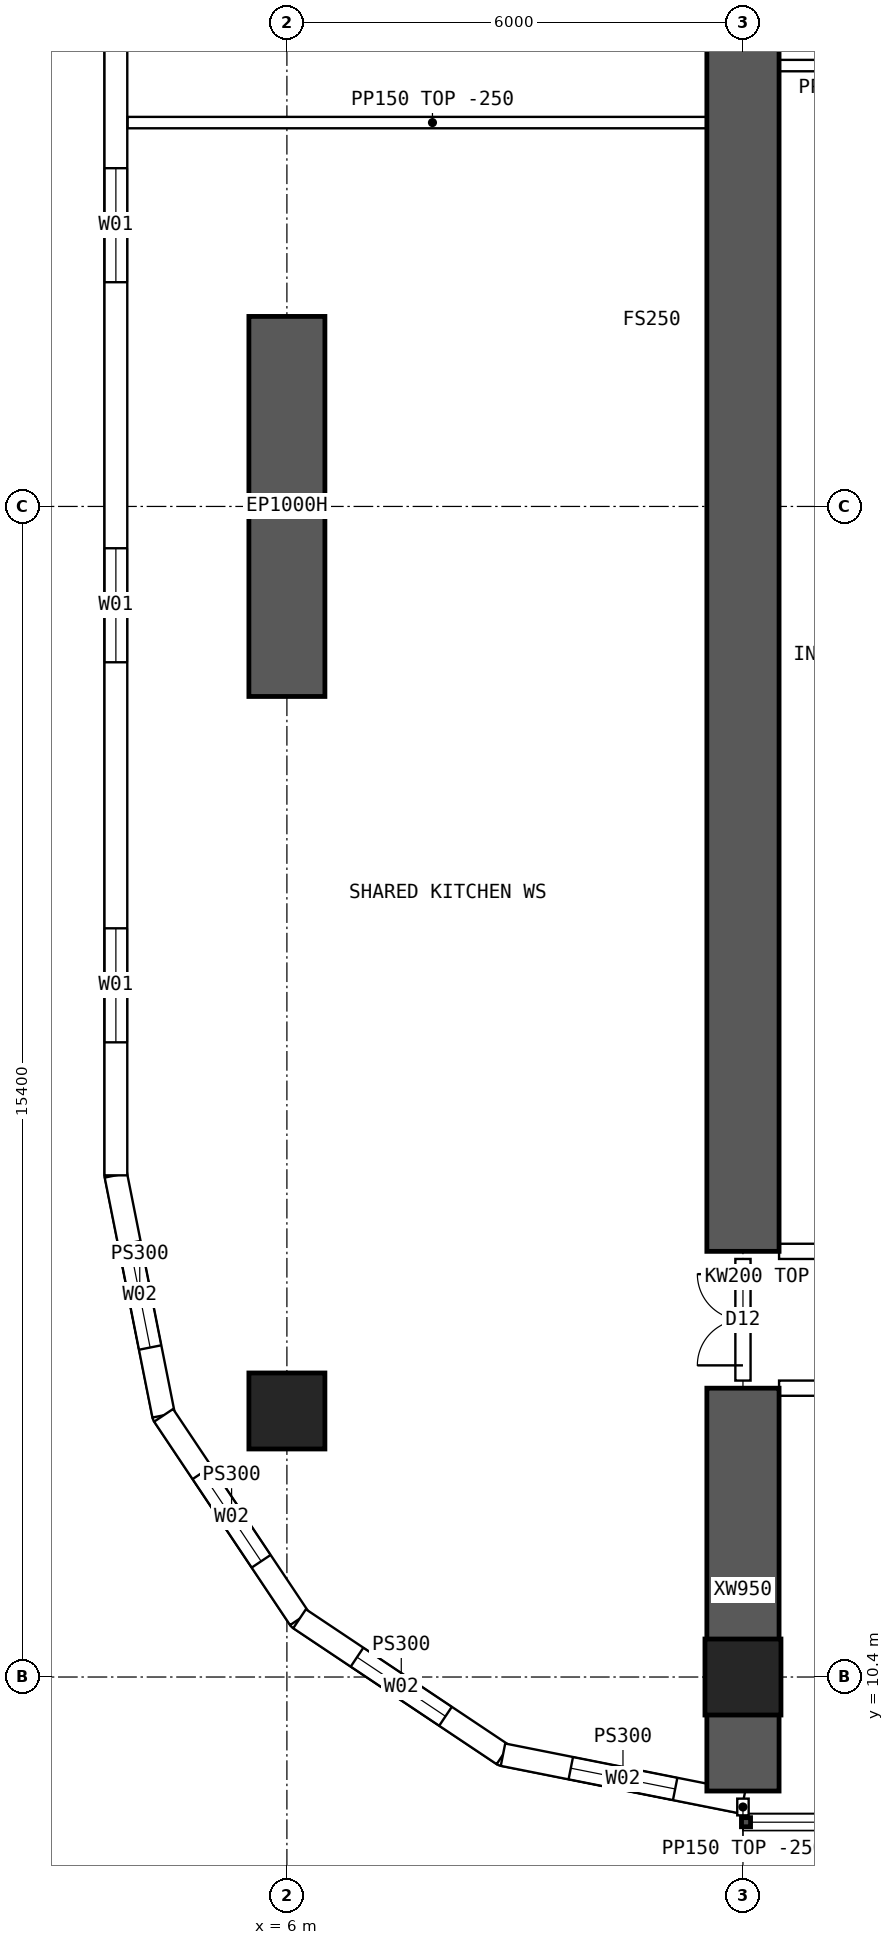
"""IFC4 building model, lengths in metres.
Left out: names, types, materials, properties, quantities, classifications, styles, units other than length and angle.
Written with IfcOpenShell. Run it as: python <this file> out.ifc"""

import sys

from ifc_helpers import new_model, si_unit, direction, frame, frame_2d, origin, origin_2d, place, context, subcontext, project, spatial, polyline, rectangle, hollow_rectangle, outline, extrude, element, fill, save


model = new_model("IFC4")
c1 = context("Model", 3, precision=1e-05, world=origin(), true_north=direction((0.0, 1.0)))
c2 = subcontext(c1, "Body", "Model", "MODEL_VIEW")
j1 = project(units=[si_unit("LENGTHUNIT", "METRE"), si_unit("PLANEANGLEUNIT", "RADIAN")], contexts=[c1])
p1 = place(None, origin())
s1 = spatial("IfcSite", under=j1, at=p1, CompositionType="ELEMENT")
p2 = place(p1, origin())
s2 = spatial("IfcBuilding", under=s1, at=p2, CompositionType="ELEMENT")
p3 = place(p2, frame((0.0, 0.0, 103.15)))
s3 = spatial("IfcBuildingStorey", under=s2, at=p3, CompositionType="ELEMENT", Elevation=103.15)
for number, where, z_axis, x_axis in (
    (1, (12.0, 10.4, 0.0), (0.0, 0.0, 1.0), (1.0, 0.0, 0.0)),
    (2, (6.0, 13.9, 0.0), (0.0, 0.0, 1.0), (1.0, 0.0, 0.0)),
):
    element("IfcColumn", number, at=place(p3, frame(where, z_axis=z_axis, x_axis=x_axis)), inside=s3, PredefinedType="COLUMN", context=c2, shape_type="SweptSolid", body=[
        extrude(hollow_rectangle(XDim=1.0, YDim=1.0, WallThickness=0.1, at=origin_2d()), origin(), (0.0, 0.0, 1.0), 3.75),
    ])
p4 = place(p3, frame((6.0, 23.3, 0.0), z_axis=(0.0, 0.0, 1.0), x_axis=(0.0, 1.0, 0.0)))
e3 = element("IfcWall", 3, at=p4, inside=s3, PredefinedType="SHEAR", context=c2, shape_type="SweptSolid", body=[
    extrude(rectangle(XDim=5.0, YDim=1.0, at=frame_2d((2.5, 0.0))), origin(), (0.0, 0.0, 1.0), 3.75),
])
p5 = place(p3, frame((12.0, 8.9, 0.0), z_axis=(0.0, 0.0, 1.0), x_axis=(0.0, 1.0, 0.0)))
e4 = element("IfcWall", 4, at=p5, inside=s3, PredefinedType="SHEAR", context=c2, shape_type="SweptSolid", body=[
    extrude(rectangle(XDim=5.3, YDim=0.95, at=frame_2d((2.65, 0.0))), origin(), (0.0, 0.0, 1.0), 3.75),
])
p6 = place(p3, frame((12.0, 16.0, 0.0), z_axis=(0.0, 0.0, 1.0), x_axis=(0.0, 1.0, 0.0)))
e5 = element("IfcWall", 5, at=p6, inside=s3, PredefinedType="SHEAR", context=c2, shape_type="SweptSolid", body=[
    extrude(rectangle(XDim=32.0, YDim=0.95, at=frame_2d((16.0, 0.0))), origin(), (0.0, 0.0, 1.0), 3.75),
])
p7 = place(p3, frame((3.75, 47.0, 0.0), z_axis=(0.0, 0.0, 1.0), x_axis=(0.0, -1.0, 0.0)))
e6 = element("IfcWall", 6, at=p7, inside=s3, PredefinedType="SOLIDWALL", context=c2, shape_type="SweptSolid", body=[
    extrude(outline(polyline([(-0.015, -0.15), (30.015, -0.15), (29.985, 0.15), (0.015, 0.15), (-0.015, -0.15)])), origin(), (0.0, 0.0, 1.0), 3.5),
])
p8 = place(p7, frame((1.75, 0.0, 0.9)))
e7 = element("IfcOpeningElement", 7, at=p8, cuts=e6, PredefinedType="OPENING", context=c2, shape_type="SweptSolid", body=[
    extrude(rectangle(XDim=1.5, YDim=2.0, at=frame_2d((0.75, 1.0))), frame((0.0, 0.16, 0.0), z_axis=(0.0, -1.0, 0.0), x_axis=(1.0, 0.0, 0.0)), (0.0, 0.0, 1.0), 0.32),
])
p9 = place(p7, frame((6.75, 0.0, 0.9)))
e8 = element("IfcOpeningElement", 8, at=p9, cuts=e6, PredefinedType="OPENING", context=c2, shape_type="SweptSolid", body=[
    extrude(rectangle(XDim=1.5, YDim=2.0, at=frame_2d((0.75, 1.0))), frame((0.0, 0.16, 0.0), z_axis=(0.0, -1.0, 0.0), x_axis=(1.0, 0.0, 0.0)), (0.0, 0.0, 1.0), 0.32),
])
p10 = place(p7, frame((11.75, 0.0, 0.9)))
e9 = element("IfcOpeningElement", 9, at=p10, cuts=e6, PredefinedType="OPENING", context=c2, shape_type="SweptSolid", body=[
    extrude(rectangle(XDim=1.5, YDim=2.0, at=frame_2d((0.75, 1.0))), frame((0.0, 0.16, 0.0), z_axis=(0.0, -1.0, 0.0), x_axis=(1.0, 0.0, 0.0)), (0.0, 0.0, 1.0), 0.32),
])
p11 = place(p7, frame((16.75, 0.0, 0.9)))
e10 = element("IfcOpeningElement", 10, at=p11, cuts=e6, PredefinedType="OPENING", context=c2, shape_type="SweptSolid", body=[
    extrude(rectangle(XDim=1.5, YDim=2.0, at=frame_2d((0.75, 1.0))), frame((0.0, 0.16, 0.0), z_axis=(0.0, -1.0, 0.0), x_axis=(1.0, 0.0, 0.0)), (0.0, 0.0, 1.0), 0.32),
])
p12 = place(p7, frame((21.75, 0.0, 0.9)))
e11 = element("IfcOpeningElement", 11, at=p12, cuts=e6, PredefinedType="OPENING", context=c2, shape_type="SweptSolid", body=[
    extrude(rectangle(XDim=1.5, YDim=2.0, at=frame_2d((0.75, 1.0))), frame((0.0, 0.16, 0.0), z_axis=(0.0, -1.0, 0.0), x_axis=(1.0, 0.0, 0.0)), (0.0, 0.0, 1.0), 0.32),
])
p13 = place(p7, frame((26.75, 0.0, 0.9)))
e12 = element("IfcOpeningElement", 12, at=p13, cuts=e6, PredefinedType="OPENING", context=c2, shape_type="SweptSolid", body=[
    extrude(rectangle(XDim=1.5, YDim=2.0, at=frame_2d((0.75, 1.0))), frame((0.0, 0.16, 0.0), z_axis=(0.0, -1.0, 0.0), x_axis=(1.0, 0.0, 0.0)), (0.0, 0.0, 1.0), 0.32),
])
p14 = place(p3, frame((3.75, 17.0, 0.0), z_axis=(0.0, 0.0, 1.0), x_axis=(0.195080412259, -0.980787251524, 0.0)))
e13 = element("IfcWall", 13, at=p14, inside=s3, PredefinedType="SOLIDWALL", context=c2, shape_type="SweptSolid", body=[
    extrude(outline(polyline([(-0.015, -0.15), (3.249, -0.15), (3.189, 0.15), (0.015, 0.15), (-0.015, -0.15)])), origin(), (0.0, 0.0, 1.0), 3.5),
])
p15 = place(p14, frame((0.909, 0.0, 0.9)))
e14 = element("IfcOpeningElement", 14, at=p15, cuts=e13, PredefinedType="OPENING", context=c2, shape_type="SweptSolid", body=[
    extrude(rectangle(XDim=1.4, YDim=1.8, at=frame_2d((0.7, 0.9))), frame((0.0, 0.16, 0.0), z_axis=(0.0, -1.0, 0.0), x_axis=(1.0, 0.0, 0.0)), (0.0, 0.0, 1.0), 0.32),
])
p16 = place(p3, frame((4.378, 13.843, 0.0), z_axis=(0.0, 0.0, 1.0), x_axis=(0.555609954424, -0.831443069936, 0.0)))
e15 = element("IfcWall", 15, at=p16, inside=s3, PredefinedType="SOLIDWALL", context=c2, shape_type="SweptSolid", body=[
    extrude(outline(polyline([(-0.03, -0.15), (3.249, -0.15), (3.189, 0.15), (0.03, 0.15), (-0.03, -0.15)])), origin(), (0.0, 0.0, 1.0), 3.5),
])
p17 = place(p16, frame((0.909, 0.0, 0.9)))
e16 = element("IfcOpeningElement", 16, at=p17, cuts=e15, PredefinedType="OPENING", context=c2, shape_type="SweptSolid", body=[
    extrude(rectangle(XDim=1.4, YDim=1.8, at=frame_2d((0.7, 0.9))), frame((0.0, 0.16, 0.0), z_axis=(0.0, -1.0, 0.0), x_axis=(1.0, 0.0, 0.0)), (0.0, 0.0, 1.0), 0.32),
])
p18 = place(p3, frame((6.167, 11.167, 0.0), z_axis=(0.0, 0.0, 1.0), x_axis=(0.831443069936, -0.555609954424, 0.0)))
e17 = element("IfcWall", 17, at=p18, inside=s3, PredefinedType="SOLIDWALL", context=c2, shape_type="SweptSolid", body=[
    extrude(outline(polyline([(-0.03, -0.15), (3.249, -0.15), (3.189, 0.15), (0.03, 0.15), (-0.03, -0.15)])), origin(), (0.0, 0.0, 1.0), 3.5),
])
p19 = place(p18, frame((0.909, 0.0, 0.9)))
e18 = element("IfcOpeningElement", 18, at=p19, cuts=e17, PredefinedType="OPENING", context=c2, shape_type="SweptSolid", body=[
    extrude(rectangle(XDim=1.4, YDim=1.8, at=frame_2d((0.7, 0.9))), frame((0.0, 0.16, 0.0), z_axis=(0.0, -1.0, 0.0), x_axis=(1.0, 0.0, 0.0)), (0.0, 0.0, 1.0), 0.32),
])
p20 = place(p3, frame((8.843, 9.378, 0.0), z_axis=(0.0, 0.0, 1.0), x_axis=(0.980787251524, -0.195080412259, 0.0)))
e19 = element("IfcWall", 19, at=p20, inside=s3, PredefinedType="SOLIDWALL", context=c2, shape_type="SweptSolid", body=[
    extrude(outline(polyline([(-0.03, -0.15), (3.249, -0.15), (3.189, 0.15), (0.03, 0.15), (-0.03, -0.15)])), origin(), (0.0, 0.0, 1.0), 3.5),
])
p21 = place(p20, frame((0.909, 0.0, 0.9)))
e20 = element("IfcOpeningElement", 20, at=p21, cuts=e19, PredefinedType="OPENING", context=c2, shape_type="SweptSolid", body=[
    extrude(rectangle(XDim=1.4, YDim=1.8, at=frame_2d((0.7, 0.9))), frame((0.0, 0.16, 0.0), z_axis=(0.0, -1.0, 0.0), x_axis=(1.0, 0.0, 0.0)), (0.0, 0.0, 1.0), 0.32),
])
p22 = place(p3, frame((12.475, 14.2, 0.0), z_axis=(0.0, 0.0, 1.0), x_axis=(1.0, 0.0, 0.0)))
e21 = element("IfcWall", 21, at=p22, inside=s3, PredefinedType="SOLIDWALL", context=c2, shape_type="SweptSolid", body=[
    extrude(outline(polyline([(0.0, 0.0), (5.05, 0.0), (5.05, 3.1), (0.0, 3.1), (0.0, 0.0)])), frame((0.0, 0.1, 0.0), z_axis=(0.0, -1.0, 0.0), x_axis=(1.0, 0.0, 0.0)), (0.0, 0.0, 1.0), 0.2),
])
p23 = place(p22, frame((0.6, 0.0, 0.0)))
e22 = element("IfcOpeningElement", 22, at=p23, cuts=e21, PredefinedType="OPENING", context=c2, shape_type="SweptSolid", body=[
    extrude(rectangle(XDim=1.0, YDim=2.1, at=frame_2d((0.5, 1.05))), frame((0.0, 0.11, 0.0), z_axis=(0.0, -1.0, 0.0), x_axis=(1.0, 0.0, 0.0)), (0.0, 0.0, 1.0), 0.22),
])
p24 = place(p3, frame((12.475, 16.0, 0.0), z_axis=(0.0, 0.0, 1.0), x_axis=(1.0, 0.0, 0.0)))
e23 = element("IfcWall", 23, at=p24, inside=s3, PredefinedType="SOLIDWALL", context=c2, shape_type="SweptSolid", body=[
    extrude(rectangle(XDim=5.05, YDim=0.2, at=frame_2d((2.525, 0.0))), origin(), (0.0, 0.0, 1.0), 3.5),
])
p25 = place(p24, frame((3.325, 0.0, 0.0)))
e24 = element("IfcOpeningElement", 24, at=p25, cuts=e23, PredefinedType="OPENING", context=c2, shape_type="SweptSolid", body=[
    extrude(rectangle(XDim=1.6, YDim=2.1, at=frame_2d((0.8, 1.05))), frame((0.0, 0.11, 0.0), z_axis=(0.0, -1.0, 0.0), x_axis=(1.0, 0.0, 0.0)), (0.0, 0.0, 1.0), 0.22),
])
p26 = place(p3, frame((12.0, 31.6, 0.0), z_axis=(0.0, 0.0, 1.0), x_axis=(1.0, 0.0, 0.0)))
e25 = element("IfcWall", 25, at=p26, inside=s3, PredefinedType="PARTITIONING", context=c2, shape_type="SweptSolid", body=[
    extrude(rectangle(XDim=3.6, YDim=0.15, at=frame_2d((1.8, 0.0))), origin(), (0.0, 0.0, 1.0), 3.5),
])
p27 = place(p3, frame((3.905, 30.85, 0.0), z_axis=(0.0, 0.0, 1.0), x_axis=(1.0, 0.0, 0.0)))
e26 = element("IfcWall", 26, at=p27, inside=s3, PredefinedType="PARTITIONING", context=c2, shape_type="SweptSolid", body=[
    extrude(outline(polyline([(0.0, 0.0), (8.02, 0.0), (8.02, 3.5), (2.397, 3.5), (2.395, 3.05), (1.797, 3.05), (1.795, 3.5), (0.0, 3.5), (0.0, 0.0)])), frame((0.0, 0.075, 0.0), z_axis=(0.0, -1.0, 0.0), x_axis=(1.0, 0.0, 0.0)), (0.0, 0.0, 1.0), 0.15),
])
p28 = place(p3, frame((12.0, 14.3, 0.0), z_axis=(0.0, 0.0, 1.0), x_axis=(0.0, 1.0, 0.0)))
e27 = element("IfcWall", 27, at=p28, inside=s3, PredefinedType="SOLIDWALL", context=c2, shape_type="SweptSolid", body=[
    extrude(outline(polyline([(0.0, 0.0), (1.6, 0.0), (1.6, 3.1), (0.0, 3.1), (0.0, 0.0)])), frame((0.0, 0.1, 0.0), z_axis=(0.0, -1.0, 0.0), x_axis=(1.0, 0.0, 0.0)), (0.0, 0.0, 1.0), 0.2),
])
p29 = place(p28, frame((0.2, 0.0, 0.0)))
e28 = element("IfcOpeningElement", 28, at=p29, cuts=e27, PredefinedType="OPENING", context=c2, shape_type="SweptSolid", body=[
    extrude(rectangle(XDim=1.2, YDim=2.1, at=frame_2d((0.6, 1.05))), frame((0.0, 0.11, 0.0), z_axis=(0.0, -1.0, 0.0), x_axis=(1.0, 0.0, 0.0)), (0.0, 0.0, 1.0), 0.22),
])
p30 = place(p3, frame((12.0, 8.8, 0.0), z_axis=(0.0, 0.0, 1.0), x_axis=(0.0, -1.0, 0.0)))
e29 = element("IfcWall", 29, at=p30, inside=s3, PredefinedType="PARTITIONING", context=c2, shape_type="SweptSolid", body=[
    extrude(rectangle(XDim=0.22, YDim=0.15, at=frame_2d((0.11, 0.0))), origin(), (0.0, 0.0, 1.0), 3.5),
])
p31 = place(p11, origin())
e30 = element("IfcWindow", 30, at=p31, inside=s3, PartitioningType="SINGLE_PANEL", PredefinedType="WINDOW", context=c2, shape_type="SweptSolid", body=[
    extrude(rectangle(XDim=1.5, YDim=2.0, at=frame_2d((0.75, 1.0))), frame((0.0, 0.03, 0.0), z_axis=(0.0, -1.0, 0.0), x_axis=(1.0, 0.0, 0.0)), (0.0, 0.0, 1.0), 0.06),
])
fill(e10, e30)
p32 = place(p12, origin())
e31 = element("IfcWindow", 31, at=p32, inside=s3, PartitioningType="SINGLE_PANEL", PredefinedType="WINDOW", context=c2, shape_type="SweptSolid", body=[
    extrude(rectangle(XDim=1.5, YDim=2.0, at=frame_2d((0.75, 1.0))), frame((0.0, 0.03, 0.0), z_axis=(0.0, -1.0, 0.0), x_axis=(1.0, 0.0, 0.0)), (0.0, 0.0, 1.0), 0.06),
])
fill(e11, e31)
p33 = place(p13, origin())
e32 = element("IfcWindow", 32, at=p33, inside=s3, PartitioningType="SINGLE_PANEL", PredefinedType="WINDOW", context=c2, shape_type="SweptSolid", body=[
    extrude(rectangle(XDim=1.5, YDim=2.0, at=frame_2d((0.75, 1.0))), frame((0.0, 0.03, 0.0), z_axis=(0.0, -1.0, 0.0), x_axis=(1.0, 0.0, 0.0)), (0.0, 0.0, 1.0), 0.06),
])
fill(e12, e32)
p34 = place(p15, origin())
e33 = element("IfcWindow", 33, at=p34, inside=s3, PartitioningType="SINGLE_PANEL", PredefinedType="WINDOW", context=c2, shape_type="SweptSolid", body=[
    extrude(rectangle(XDim=1.4, YDim=1.8, at=frame_2d((0.7, 0.9))), frame((0.0, 0.03, 0.0), z_axis=(0.0, -1.0, 0.0), x_axis=(1.0, 0.0, 0.0)), (0.0, 0.0, 1.0), 0.06),
])
fill(e14, e33)
p35 = place(p17, origin())
e34 = element("IfcWindow", 34, at=p35, inside=s3, PartitioningType="SINGLE_PANEL", PredefinedType="WINDOW", context=c2, shape_type="SweptSolid", body=[
    extrude(rectangle(XDim=1.4, YDim=1.8, at=frame_2d((0.7, 0.9))), frame((0.0, 0.03, 0.0), z_axis=(0.0, -1.0, 0.0), x_axis=(1.0, 0.0, 0.0)), (0.0, 0.0, 1.0), 0.06),
])
fill(e16, e34)
p36 = place(p19, origin())
e35 = element("IfcWindow", 35, at=p36, inside=s3, PartitioningType="SINGLE_PANEL", PredefinedType="WINDOW", context=c2, shape_type="SweptSolid", body=[
    extrude(rectangle(XDim=1.4, YDim=1.8, at=frame_2d((0.7, 0.9))), frame((0.0, 0.03, 0.0), z_axis=(0.0, -1.0, 0.0), x_axis=(1.0, 0.0, 0.0)), (0.0, 0.0, 1.0), 0.06),
])
fill(e18, e35)
p37 = place(p21, origin())
e36 = element("IfcWindow", 36, at=p37, inside=s3, PartitioningType="SINGLE_PANEL", PredefinedType="WINDOW", context=c2, shape_type="SweptSolid", body=[
    extrude(rectangle(XDim=1.4, YDim=1.8, at=frame_2d((0.7, 0.9))), frame((0.0, 0.03, 0.0), z_axis=(0.0, -1.0, 0.0), x_axis=(1.0, 0.0, 0.0)), (0.0, 0.0, 1.0), 0.06),
])
fill(e20, e36)
p38 = place(p29, origin())
e37 = element("IfcDoor", 37, at=p38, inside=s3, OperationType="DOUBLE_DOOR_SINGLE_SWING", PredefinedType="DOOR", context=c2, shape_type="SweptSolid", body=[
    extrude(rectangle(XDim=1.2, YDim=2.1, at=frame_2d((0.6, 1.05))), frame((0.0, 0.025, 0.0), z_axis=(0.0, -1.0, 0.0), x_axis=(1.0, 0.0, 0.0)), (0.0, 0.0, 1.0), 0.05),
])
fill(e28, e37)
save(model, sys.argv[1])
